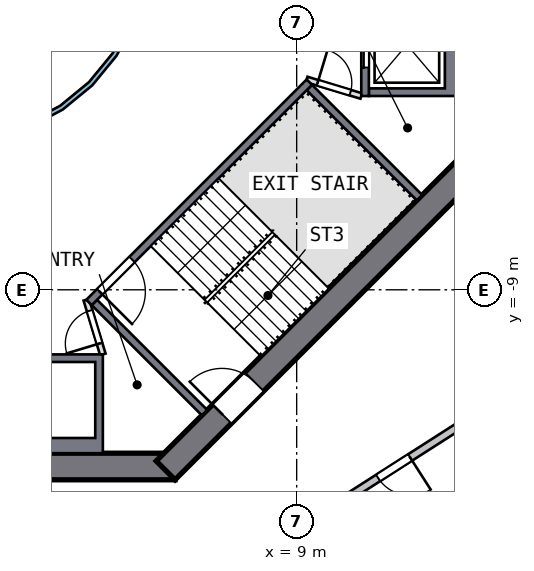
"""IFC4 building model, lengths in metres.
Left out: names, types, materials, properties, quantities, classifications, styles, units other than length and angle.
Written with IfcOpenShell. Run it as: python <this file> out.ifc"""

import sys

from ifc_helpers import new_model, si_unit, direction, frame, frame_2d, origin, place, context, subcontext, project, spatial, polyline, rectangle, outline, extrude, element, fill, save


model = new_model("IFC4")
c1 = context("Model", 3, precision=1e-05, world=origin(), true_north=direction((0.0, 1.0)))
c2 = subcontext(c1, "Body", "Model", "MODEL_VIEW")
j1 = project(units=[si_unit("LENGTHUNIT", "METRE"), si_unit("PLANEANGLEUNIT", "RADIAN")], contexts=[c1])
p1 = place(None, origin())
s1 = spatial("IfcSite", under=j1, at=p1, CompositionType="ELEMENT")
p2 = place(p1, origin())
s2 = spatial("IfcBuilding", under=s1, at=p2, CompositionType="ELEMENT")
p3 = place(p2, frame((0.0, 0.0, 165.5)))
s3 = spatial("IfcBuildingStorey", under=s2, at=p3, CompositionType="ELEMENT", Elevation=165.5)
p4 = place(p3, frame((-5.799, -13.65, 0.0), z_axis=(0.0, 0.0, 1.0), x_axis=(1.0, 0.0, 0.0)))
e1 = element("IfcWall", 1, at=p4, inside=s3, PredefinedType="SHEAR", context=c2, shape_type="SweptSolid", body=[
    extrude(rectangle(XDim=11.598, YDim=0.7, at=frame_2d((5.799, 0.0))), origin(), (0.0, 0.0, 1.0), 3.5),
])
p5 = place(p4, frame((4.899, 0.0, 0.0)))
e2 = element("IfcOpeningElement", 2, at=p5, cuts=e1, PredefinedType="OPENING", context=c2, shape_type="SweptSolid", body=[
    extrude(rectangle(XDim=1.8, YDim=2.1, at=frame_2d((0.9, 1.05))), frame((0.0, 0.36, 0.0), z_axis=(0.0, -1.0, 0.0), x_axis=(1.0, 0.0, 0.0)), (0.0, 0.0, 1.0), 0.72),
])
p6 = place(p3, frame((5.552, -13.752, 0.0), z_axis=(0.0, 0.0, 1.0), x_axis=(0.707106781, 0.707106781, 0.0)))
e3 = element("IfcWall", 3, at=p6, inside=s3, PredefinedType="SHEAR", context=c2, shape_type="SweptSolid", body=[
    extrude(rectangle(XDim=11.598, YDim=0.7, at=frame_2d((5.799, 0.0))), origin(), (0.0, 0.0, 1.0), 3.5),
])
p7 = place(p6, frame((2.099, 0.0, 0.0)))
e4 = element("IfcOpeningElement", 4, at=p7, cuts=e3, PredefinedType="OPENING", context=c2, shape_type="SweptSolid", body=[
    extrude(rectangle(XDim=1.2, YDim=2.1, at=frame_2d((0.6, 1.05))), frame((0.0, 0.36, 0.0), z_axis=(0.0, -1.0, 0.0), x_axis=(1.0, 0.0, 0.0)), (0.0, 0.0, 1.0), 0.72),
])
p8 = place(p3, origin())
e5 = element("IfcWall", 5, at=p8, inside=s3, PredefinedType="SOLIDWALL", context=c2, shape_type="SweptSolid", body=[
    extrude(outline(polyline([(13.3, -3.9), (10.9, -3.9), (10.9, -3.7), (12.9, -3.7), (12.9, -1.4), (10.9, -1.4), (10.9, -1.2), (13.3, -1.2), (13.3, -3.9)])), origin(), (0.0, 0.0, 1.0), 3.0),
])
p9 = place(p3, frame((10.8, -1.2, 0.0), z_axis=(0.0, 0.0, 1.0), x_axis=(0.0, -1.0, 0.0)))
e6 = element("IfcWall", 6, at=p9, inside=s3, PredefinedType="SOLIDWALL", context=c2, shape_type="SweptSolid", body=[
    extrude(rectangle(XDim=2.7, YDim=0.2, at=frame_2d((1.35, 0.0))), origin(), (0.0, 0.0, 1.0), 3.0),
])
p10 = place(p9, frame((0.75, 0.0, 0.0)))
e7 = element("IfcOpeningElement", 7, at=p10, cuts=e6, PredefinedType="OPENING", context=c2, shape_type="SweptSolid", body=[
    extrude(rectangle(XDim=1.2, YDim=2.1, at=frame_2d((0.6, 1.05))), frame((0.0, 0.11, 0.0), z_axis=(0.0, -1.0, 0.0), x_axis=(1.0, 0.0, 0.0)), (0.0, 0.0, 1.0), 0.22),
])
p11 = place(p3, origin())
e8 = element("IfcWall", 8, at=p11, inside=s3, PredefinedType="SOLIDWALL", context=c2, shape_type="SweptSolid", body=[
    extrude(outline(polyline([(3.9, -10.7), (3.9, -13.3), (1.2, -13.3), (1.2, -10.7), (3.9, -10.7)]), holes=[polyline([(1.4, -12.9), (3.7, -12.9), (3.7, -10.9), (1.4, -10.9), (1.4, -12.9)])]), origin(), (0.0, 0.0, 1.0), 3.0),
])
p12 = place(p3, frame((9.334, -3.535, 0.0), z_axis=(0.0, 0.0, 1.0), x_axis=(-0.707106781, -0.707106781, 0.0)))
e9 = element("IfcWall", 9, at=p12, inside=s3, PredefinedType="SOLIDWALL", context=c2, shape_type="SweptSolid", body=[
    extrude(rectangle(XDim=8.2, YDim=0.2, at=frame_2d((4.1, 0.0))), origin(), (0.0, 0.0, 1.0), 3.0),
])
p13 = place(p12, frame((6.6, 0.0, 0.0)))
e10 = element("IfcOpeningElement", 10, at=p13, cuts=e9, PredefinedType="OPENING", context=c2, shape_type="SweptSolid", body=[
    extrude(rectangle(XDim=1.2, YDim=2.1, at=frame_2d((0.6, 1.05))), frame((0.0, 0.11, 0.0), z_axis=(0.0, -1.0, 0.0), x_axis=(1.0, 0.0, 0.0)), (0.0, 0.0, 1.0), 0.22),
])
for number, where, z_axis, x_axis in (
    (11, (3.677, -9.334, 0.0), (0.0, 0.0, 1.0), (0.707, -0.707, 0.0)),
    (12, (9.334, -3.677, 0.0), (0.0, 0.0, 1.0), (0.707, -0.707, 0.0)),
):
    element("IfcWall", number, at=place(p3, frame(where, z_axis=z_axis, x_axis=x_axis)), inside=s3, PredefinedType="SOLIDWALL", context=c2, shape_type="SweptSolid", body=[
        extrude(rectangle(XDim=4.1, YDim=0.2, at=frame_2d((2.05, 0.0))), origin(), (0.0, 0.0, 1.0), 3.0),
    ])
p14 = place(p3, frame((3.9, -10.7, 0.0), z_axis=(0.0, 0.0, 1.0), x_axis=(-0.289808785, 0.957084567, 0.0)))
e13 = element("IfcWall", 13, at=p14, inside=s3, PredefinedType="PARTITIONING", context=c2, shape_type="SweptSolid", body=[
    extrude(rectangle(XDim=1.501, YDim=0.15, at=frame_2d((0.75, 0.0))), origin(), (0.0, 0.0, 1.0), 3.0),
])
p15 = place(p14, frame((0.301, 0.0, 0.0)))
e14 = element("IfcOpeningElement", 14, at=p15, cuts=e13, PredefinedType="OPENING", context=c2, shape_type="SweptSolid", body=[
    extrude(rectangle(XDim=0.9, YDim=2.1, at=frame_2d((0.45, 1.05))), frame((0.0, 0.085, 0.0), z_axis=(0.0, -1.0, 0.0), x_axis=(1.0, 0.0, 0.0)), (0.0, 0.0, 1.0), 0.17),
])
p16 = place(p3, frame((9.263, -3.465, 0.0), z_axis=(0.0, 0.0, 1.0), x_axis=(0.957084567, -0.289808785, 0.0)))
e15 = element("IfcWall", 15, at=p16, inside=s3, PredefinedType="PARTITIONING", context=c2, shape_type="SweptSolid", body=[
    extrude(rectangle(XDim=1.501, YDim=0.15, at=frame_2d((0.75, 0.0))), origin(), (0.0, 0.0, 1.0), 3.0),
])
p17 = place(p16, frame((0.301, 0.0, 0.0)))
e16 = element("IfcOpeningElement", 16, at=p17, cuts=e15, PredefinedType="OPENING", context=c2, shape_type="SweptSolid", body=[
    extrude(rectangle(XDim=0.9, YDim=2.1, at=frame_2d((0.45, 1.05))), frame((0.0, 0.085, 0.0), z_axis=(0.0, -1.0, 0.0), x_axis=(1.0, 0.0, 0.0)), (0.0, 0.0, 1.0), 0.17),
])
p18 = place(p3, origin())
e17 = element("IfcWall", 17, at=p18, inside=s3, PredefinedType="SOLIDWALL", context=c2, shape_type="SweptSolid", body=[
    extrude(outline(polyline([(5.021, -0.999), (4.73, -1.959), (4.257, -2.844), (3.62, -3.62), (2.844, -4.257), (1.959, -4.73), (0.999, -5.021), (0.0, -5.12), (-0.999, -5.021), (-1.959, -4.73), (-2.844, -4.257), (-3.62, -3.62), (-4.257, -2.844), (-4.73, -1.959), (-5.021, -0.999), (-5.12, 0.0), (-5.021, 0.999), (-4.73, 1.959), (-4.257, 2.844), (-3.62, 3.62), (-2.844, 4.257), (-1.959, 4.73), (-0.999, 5.021), (0.0, 5.12), (0.999, 5.021), (1.959, 4.73), (2.844, 4.257), (3.62, 3.62), (4.257, 2.844), (4.73, 1.959), (5.021, 0.999), (5.12, 0.0), (5.021, -0.999)]), holes=[polyline([(4.904, 0.976), (4.619, 1.913), (4.157, 2.778), (3.535, 3.535), (2.778, 4.157), (1.913, 4.619), (0.976, 4.904), (0.0, 5.0), (-0.976, 4.904), (-1.913, 4.619), (-2.778, 4.157), (-3.535, 3.535), (-4.157, 2.778), (-4.619, 1.913), (-4.904, 0.976), (-5.0, 0.0), (-4.904, -0.976), (-4.619, -1.913), (-4.157, -2.778), (-3.535, -3.535), (-2.778, -4.157), (-1.913, -4.619), (-0.976, -4.904), (0.0, -5.0), (0.976, -4.904), (1.913, -4.619), (2.778, -4.157), (3.535, -3.535), (4.157, -2.778), (4.619, -1.913), (4.904, -0.976), (5.0, 0.0), (4.904, 0.976)])]), origin(), (0.0, 0.0, 1.0), 3.0),
])
p19 = place(p3, frame((13.585, -12.387, 0.0), z_axis=(0.0, 0.0, 1.0), x_axis=(-0.842082403, -0.539348892, 0.0)))
e18 = element("IfcWall", 18, at=p19, inside=s3, PredefinedType="SOLIDWALL", context=c2, shape_type="SweptSolid", body=[
    extrude(rectangle(XDim=9.316, YDim=0.2, at=frame_2d((4.658, 0.0))), origin(), (0.0, 0.0, 1.0), 3.0),
])
p20 = place(p19, frame((1.9, 0.0, 0.0)))
e19 = element("IfcOpeningElement", 19, at=p20, cuts=e18, PredefinedType="OPENING", context=c2, shape_type="SweptSolid", body=[
    extrude(rectangle(XDim=1.0, YDim=2.1, at=frame_2d((0.5, 1.05))), frame((0.0, 0.11, 0.0), z_axis=(0.0, -1.0, 0.0), x_axis=(1.0, 0.0, 0.0)), (0.0, 0.0, 1.0), 0.22),
])
p21 = place(p10, origin())
e20 = element("IfcDoor", 20, at=p21, inside=s3, OperationType="DOUBLE_DOOR_SLIDING", PredefinedType="DOOR", context=c2, shape_type="SweptSolid", body=[
    extrude(rectangle(XDim=1.2, YDim=2.1, at=frame_2d((0.6, 1.05))), frame((0.0, 0.025, 0.0), z_axis=(0.0, -1.0, 0.0), x_axis=(1.0, 0.0, 0.0)), (0.0, 0.0, 1.0), 0.05),
])
fill(e7, e20)
p22 = place(p13, origin())
e21 = element("IfcDoor", 21, at=p22, inside=s3, OperationType="SINGLE_SWING_RIGHT", PredefinedType="DOOR", context=c2, shape_type="SweptSolid", body=[
    extrude(rectangle(XDim=1.2, YDim=2.1, at=frame_2d((0.6, 1.05))), frame((0.0, 0.025, 0.0), z_axis=(0.0, -1.0, 0.0), x_axis=(1.0, 0.0, 0.0)), (0.0, 0.0, 1.0), 0.05),
])
fill(e10, e21)
p23 = place(p7, origin())
e22 = element("IfcDoor", 22, at=p23, inside=s3, OperationType="SINGLE_SWING_LEFT", PredefinedType="DOOR", context=c2, shape_type="SweptSolid", body=[
    extrude(rectangle(XDim=1.2, YDim=2.1, at=frame_2d((0.6, 1.05))), frame((0.0, 0.025, 0.0), z_axis=(0.0, -1.0, 0.0), x_axis=(1.0, 0.0, 0.0)), (0.0, 0.0, 1.0), 0.05),
])
fill(e4, e22)
p24 = place(p15, origin())
e23 = element("IfcDoor", 23, at=p24, inside=s3, OperationType="SINGLE_SWING_LEFT", PredefinedType="DOOR", context=c2, shape_type="SweptSolid", body=[
    extrude(rectangle(XDim=0.9, YDim=2.1, at=frame_2d((0.45, 1.05))), frame((0.0, 0.025, 0.0), z_axis=(0.0, -1.0, 0.0), x_axis=(1.0, 0.0, 0.0)), (0.0, 0.0, 1.0), 0.05),
])
fill(e14, e23)
p25 = place(p17, origin())
e24 = element("IfcDoor", 24, at=p25, inside=s3, OperationType="SINGLE_SWING_LEFT", PredefinedType="DOOR", context=c2, shape_type="SweptSolid", body=[
    extrude(rectangle(XDim=0.9, YDim=2.1, at=frame_2d((0.45, 1.05))), frame((0.0, 0.025, 0.0), z_axis=(0.0, -1.0, 0.0), x_axis=(1.0, 0.0, 0.0)), (0.0, 0.0, 1.0), 0.05),
])
fill(e16, e24)
p26 = place(p20, origin())
e25 = element("IfcDoor", 25, at=p26, inside=s3, OperationType="SINGLE_SWING_LEFT", PredefinedType="DOOR", context=c2, shape_type="SweptSolid", body=[
    extrude(rectangle(XDim=1.0, YDim=2.1, at=frame_2d((0.5, 1.05))), frame((0.0, 0.025, 0.0), z_axis=(0.0, -1.0, 0.0), x_axis=(1.0, 0.0, 0.0)), (0.0, 0.0, 1.0), 0.05),
])
fill(e19, e25)
save(model, sys.argv[1])
